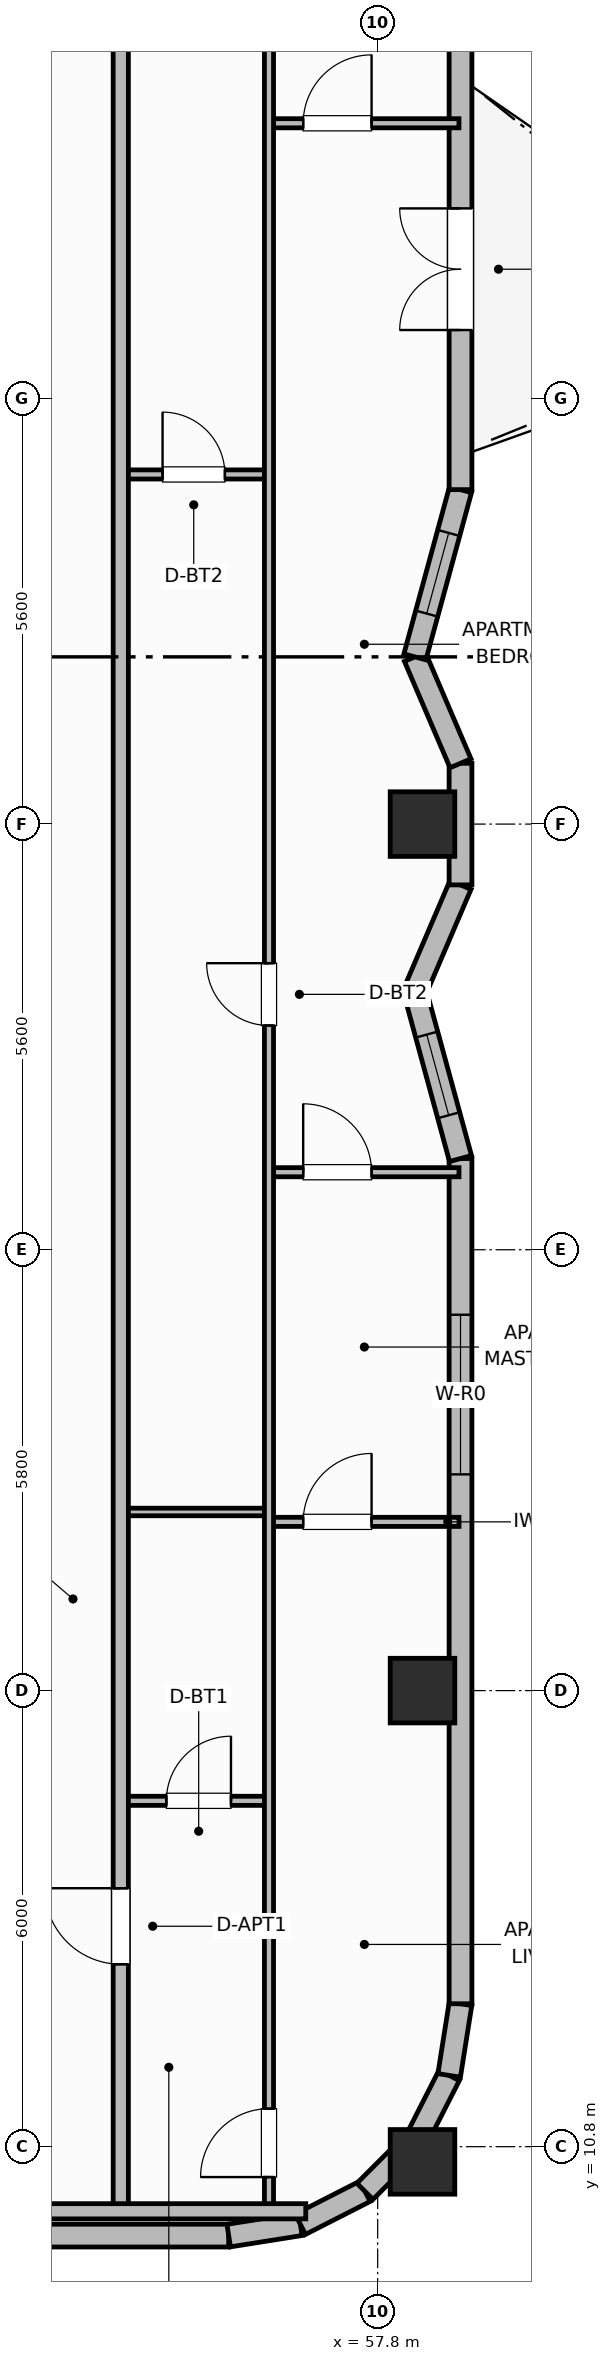
"""IFC4 building model, lengths in metres.
Left out: names, types, materials, properties, quantities, classifications, styles, units other than length and angle.
Written with IfcOpenShell. Run it as: python <this file> out.ifc"""

import sys

from ifc_helpers import new_model, si_unit, direction, frame, frame_2d, origin, origin_2d, place, context, subcontext, project, spatial, rectangle, extrude, element, fill, save


model = new_model("IFC4")
c1 = context("Model", 3, precision=1e-05, world=origin(), true_north=direction((0.0, 1.0)))
c2 = subcontext(c1, "Body", "Model", "MODEL_VIEW")
j1 = project(units=[si_unit("LENGTHUNIT", "METRE"), si_unit("PLANEANGLEUNIT", "RADIAN")], contexts=[c1])
p1 = place(None, origin())
s1 = spatial("IfcSite", under=j1, at=p1, CompositionType="ELEMENT")
p2 = place(p1, origin())
s2 = spatial("IfcBuilding", under=s1, at=p2, CompositionType="ELEMENT")
p3 = place(p2, frame((0.0, 0.0, 251.7)))
s3 = spatial("IfcBuildingStorey", under=s2, at=p3, CompositionType="ELEMENT", Elevation=251.7)
for number, where, z_axis, x_axis in (
    (1, (58.39, 10.6, 0.0), (0.0, 0.0, 1.0), (1.0, 0.0, 0.0)),
    (2, (58.39, 16.8, 0.0), (0.0, 0.0, 1.0), (1.0, 0.0, 0.0)),
    (3, (58.39, 28.2, 0.0), (0.0, 0.0, 1.0), (1.0, 0.0, 0.0)),
):
    element("IfcColumn", number, at=place(p3, frame(where, z_axis=z_axis, x_axis=x_axis)), inside=s3, PredefinedType="COLUMN", context=c2, shape_type="SweptSolid", body=[
        extrude(rectangle(XDim=0.85, YDim=0.85, at=origin_2d()), origin(), (0.0, 0.0, 1.0), 3.7),
    ])
p4 = place(p3, frame((22.56, 9.63, 0.0), z_axis=(0.0, 0.0, 1.0), x_axis=(1.0, 0.0, 0.0)))
e4 = element("IfcWall", 4, at=p4, inside=s3, PredefinedType="SOLIDWALL", context=c2, shape_type="SweptSolid", body=[
    extrude(rectangle(XDim=33.28, YDim=0.3, at=frame_2d((16.64, 0.0))), origin(), (0.0, 0.0, 1.0), 2.73),
])
p5 = place(p4, frame((4.461, 0.0, 0.95)))
e5 = element("IfcOpeningElement", 5, at=p5, cuts=e4, PredefinedType="OPENING", context=c2, shape_type="SweptSolid", body=[
    extrude(rectangle(XDim=1.1, YDim=1.65, at=frame_2d((0.55, 0.825))), frame((0.0, 0.16, 0.0), z_axis=(0.0, -1.0, 0.0), x_axis=(1.0, 0.0, 0.0)), (0.0, 0.0, 1.0), 0.32),
])
p6 = place(p4, frame((7.368, 0.0, 0.95)))
e6 = element("IfcOpeningElement", 6, at=p6, cuts=e4, PredefinedType="OPENING", context=c2, shape_type="SweptSolid", body=[
    extrude(rectangle(XDim=1.1, YDim=1.65, at=frame_2d((0.55, 0.825))), frame((0.0, 0.16, 0.0), z_axis=(0.0, -1.0, 0.0), x_axis=(1.0, 0.0, 0.0)), (0.0, 0.0, 1.0), 0.32),
])
p7 = place(p4, frame((10.275, 0.0, 0.95)))
e7 = element("IfcOpeningElement", 7, at=p7, cuts=e4, PredefinedType="OPENING", context=c2, shape_type="SweptSolid", body=[
    extrude(rectangle(XDim=1.1, YDim=1.65, at=frame_2d((0.55, 0.825))), frame((0.0, 0.16, 0.0), z_axis=(0.0, -1.0, 0.0), x_axis=(1.0, 0.0, 0.0)), (0.0, 0.0, 1.0), 0.32),
])
p8 = place(p4, frame((13.883, 0.0, 0.95)))
e8 = element("IfcOpeningElement", 8, at=p8, cuts=e4, PredefinedType="OPENING", context=c2, shape_type="SweptSolid", body=[
    extrude(rectangle(XDim=1.1, YDim=1.65, at=frame_2d((0.55, 0.825))), frame((0.0, 0.16, 0.0), z_axis=(0.0, -1.0, 0.0), x_axis=(1.0, 0.0, 0.0)), (0.0, 0.0, 1.0), 0.32),
])
p9 = place(p4, frame((16.09, 0.0, 0.95)))
e9 = element("IfcOpeningElement", 9, at=p9, cuts=e4, PredefinedType="OPENING", context=c2, shape_type="SweptSolid", body=[
    extrude(rectangle(XDim=1.1, YDim=1.65, at=frame_2d((0.55, 0.825))), frame((0.0, 0.16, 0.0), z_axis=(0.0, -1.0, 0.0), x_axis=(1.0, 0.0, 0.0)), (0.0, 0.0, 1.0), 0.32),
])
p10 = place(p4, frame((18.297, 0.0, 0.95)))
e10 = element("IfcOpeningElement", 10, at=p10, cuts=e4, PredefinedType="OPENING", context=c2, shape_type="SweptSolid", body=[
    extrude(rectangle(XDim=1.1, YDim=1.65, at=frame_2d((0.55, 0.825))), frame((0.0, 0.16, 0.0), z_axis=(0.0, -1.0, 0.0), x_axis=(1.0, 0.0, 0.0)), (0.0, 0.0, 1.0), 0.32),
])
p11 = place(p4, frame((21.905, 0.0, 0.95)))
e11 = element("IfcOpeningElement", 11, at=p11, cuts=e4, PredefinedType="OPENING", context=c2, shape_type="SweptSolid", body=[
    extrude(rectangle(XDim=1.1, YDim=1.65, at=frame_2d((0.55, 0.825))), frame((0.0, 0.16, 0.0), z_axis=(0.0, -1.0, 0.0), x_axis=(1.0, 0.0, 0.0)), (0.0, 0.0, 1.0), 0.32),
])
p12 = place(p4, frame((24.812, 0.0, 0.95)))
e12 = element("IfcOpeningElement", 12, at=p12, cuts=e4, PredefinedType="OPENING", context=c2, shape_type="SweptSolid", body=[
    extrude(rectangle(XDim=1.1, YDim=1.65, at=frame_2d((0.55, 0.825))), frame((0.0, 0.16, 0.0), z_axis=(0.0, -1.0, 0.0), x_axis=(1.0, 0.0, 0.0)), (0.0, 0.0, 1.0), 0.32),
])
p13 = place(p4, frame((27.719, 0.0, 0.95)))
e13 = element("IfcOpeningElement", 13, at=p13, cuts=e4, PredefinedType="OPENING", context=c2, shape_type="SweptSolid", body=[
    extrude(rectangle(XDim=1.1, YDim=1.65, at=frame_2d((0.55, 0.825))), frame((0.0, 0.16, 0.0), z_axis=(0.0, -1.0, 0.0), x_axis=(1.0, 0.0, 0.0)), (0.0, 0.0, 1.0), 0.32),
])
p14 = place(p3, frame((55.84, 9.63, 0.0), z_axis=(0.0, 0.0, 1.0), x_axis=(0.987663181641, 0.156593229835, 0.0)))
e14 = element("IfcWall", 14, at=p14, inside=s3, PredefinedType="SOLIDWALL", context=c2, shape_type="SweptSolid", body=[
    extrude(rectangle(XDim=0.954, YDim=0.3, at=frame_2d((0.477, 0.0))), origin(), (0.0, 0.0, 1.0), 2.73),
])
for number, where, z_axis, x_axis in (
    (15, (56.782, 9.779, 0.0), (0.0, 0.0, 1.0), (0.891, 0.454, 0.0)),
    (16, (57.633, 10.212, 0.0), (0.0, 0.0, 1.0), (0.707, 0.707, 0.0)),
    (17, (58.308, 10.887, 0.0), (0.0, 0.0, 1.0), (0.454, 0.891, 0.0)),
):
    element("IfcWall", number, at=place(p3, frame(where, z_axis=z_axis, x_axis=x_axis)), inside=s3, PredefinedType="SOLIDWALL", context=c2, shape_type="SweptSolid", body=[
        extrude(rectangle(XDim=0.954, YDim=0.3, at=frame_2d((0.477, 0.0))), origin(), (0.0, 0.0, 1.0), 2.73),
    ])
p15 = place(p3, frame((58.741, 11.738, 0.0), z_axis=(0.0, 0.0, 1.0), x_axis=(0.156343617883, 0.987702725088, 0.0)))
e18 = element("IfcWall", 18, at=p15, inside=s3, PredefinedType="SOLIDWALL", context=c2, shape_type="SweptSolid", body=[
    extrude(rectangle(XDim=0.954, YDim=0.3, at=frame_2d((0.477, 0.0))), origin(), (0.0, 0.0, 1.0), 2.73),
])
p16 = place(p3, frame((58.89, 12.68, 0.0), z_axis=(0.0, 0.0, 1.0), x_axis=(0.0, 1.0, 0.0)))
e19 = element("IfcWall", 19, at=p16, inside=s3, PredefinedType="SOLIDWALL", context=c2, shape_type="SweptSolid", body=[
    extrude(rectangle(XDim=11.12, YDim=0.3, at=frame_2d((5.56, 0.0))), origin(), (0.0, 0.0, 1.0), 2.73),
])
p17 = place(p16, frame((6.965, 0.0, 0.71)))
e20 = element("IfcOpeningElement", 20, at=p17, cuts=e19, PredefinedType="OPENING", context=c2, shape_type="SweptSolid", body=[
    extrude(rectangle(XDim=2.1, YDim=1.9, at=frame_2d((1.05, 0.95))), frame((0.0, 0.16, 0.0), z_axis=(0.0, -1.0, 0.0), x_axis=(1.0, 0.0, 0.0)), (0.0, 0.0, 1.0), 0.32),
])
p18 = place(p3, frame((58.89, 23.8, 0.0), z_axis=(0.0, 0.0, 1.0), x_axis=(-0.2630630484, 0.964778644336, 0.0)))
e21 = element("IfcWall", 21, at=p18, inside=s3, PredefinedType="SOLIDWALL", context=c2, shape_type="SweptSolid", body=[
    extrude(rectangle(XDim=2.28, YDim=0.3, at=frame_2d((1.14, 0.0))), origin(), (0.0, 0.0, 1.0), 2.73),
])
p19 = place(p18, frame((0.59, 0.0, 0.92)))
e22 = element("IfcOpeningElement", 22, at=p19, cuts=e21, PredefinedType="OPENING", context=c2, shape_type="SweptSolid", body=[
    extrude(rectangle(XDim=1.1, YDim=1.65, at=frame_2d((0.55, 0.825))), frame((0.0, 0.16, 0.0), z_axis=(0.0, -1.0, 0.0), x_axis=(1.0, 0.0, 0.0)), (0.0, 0.0, 1.0), 0.32),
])
p20 = place(p3, frame((58.29, 26.0, 0.0), z_axis=(0.0, 0.0, 1.0), x_axis=(0.393861257526, 0.919169902586, 0.0)))
e23 = element("IfcWall", 23, at=p20, inside=s3, PredefinedType="SOLIDWALL", context=c2, shape_type="SweptSolid", body=[
    extrude(rectangle(XDim=1.523, YDim=0.3, at=frame_2d((0.761, 0.0))), origin(), (0.0, 0.0, 1.0), 2.73),
])
p21 = place(p3, frame((58.89, 27.4, 0.0), z_axis=(0.0, 0.0, 1.0), x_axis=(0.0, 1.0, 0.0)))
e24 = element("IfcWall", 24, at=p21, inside=s3, PredefinedType="SOLIDWALL", context=c2, shape_type="SweptSolid", body=[
    extrude(rectangle(XDim=1.6, YDim=0.3, at=frame_2d((0.8, 0.0))), origin(), (0.0, 0.0, 1.0), 2.73),
])
p22 = place(p3, frame((58.89, 29.0, 0.0), z_axis=(0.0, 0.0, 1.0), x_axis=(-0.393861257526, 0.919169902586, 0.0)))
e25 = element("IfcWall", 25, at=p22, inside=s3, PredefinedType="SOLIDWALL", context=c2, shape_type="SweptSolid", body=[
    extrude(rectangle(XDim=1.523, YDim=0.3, at=frame_2d((0.761, 0.0))), origin(), (0.0, 0.0, 1.0), 2.73),
])
p23 = place(p3, frame((58.29, 30.4, 0.0), z_axis=(0.0, 0.0, 1.0), x_axis=(0.263035877812, 0.96478605244, 0.0)))
e26 = element("IfcWall", 26, at=p23, inside=s3, PredefinedType="SOLIDWALL", context=c2, shape_type="SweptSolid", body=[
    extrude(rectangle(XDim=2.281, YDim=0.3, at=frame_2d((1.14, 0.0))), origin(), (0.0, 0.0, 1.0), 2.73),
])
p24 = place(p23, frame((0.59, 0.0, 0.92)))
e27 = element("IfcOpeningElement", 27, at=p24, cuts=e26, PredefinedType="OPENING", context=c2, shape_type="SweptSolid", body=[
    extrude(rectangle(XDim=1.1, YDim=1.65, at=frame_2d((0.55, 0.825))), frame((0.0, 0.16, 0.0), z_axis=(0.0, -1.0, 0.0), x_axis=(1.0, 0.0, 0.0)), (0.0, 0.0, 1.0), 0.32),
])
p25 = place(p3, frame((58.89, 32.6, 0.0), z_axis=(0.0, 0.0, 1.0), x_axis=(0.0, 1.0, 0.0)))
e28 = element("IfcWall", 28, at=p25, inside=s3, PredefinedType="SOLIDWALL", context=c2, shape_type="SweptSolid", body=[
    extrude(rectangle(XDim=11.12, YDim=0.3, at=frame_2d((5.56, 0.0))), origin(), (0.0, 0.0, 1.0), 2.73),
])
p26 = place(p25, frame((2.1, 0.0, 0.0)))
e29 = element("IfcOpeningElement", 29, at=p26, cuts=e28, PredefinedType="OPENING", context=c2, shape_type="SweptSolid", body=[
    extrude(rectangle(XDim=1.6, YDim=2.1, at=frame_2d((0.8, 1.05))), frame((0.0, 0.16, 0.0), z_axis=(0.0, -1.0, 0.0), x_axis=(1.0, 0.0, 0.0)), (0.0, 0.0, 1.0), 0.32),
])
p27 = place(p25, frame((8.64, 0.0, 0.72)))
e30 = element("IfcOpeningElement", 30, at=p27, cuts=e28, PredefinedType="OPENING", context=c2, shape_type="SweptSolid", body=[
    extrude(rectangle(XDim=1.4, YDim=1.85, at=frame_2d((0.7, 0.925))), frame((0.0, 0.16, 0.0), z_axis=(0.0, -1.0, 0.0), x_axis=(1.0, 0.0, 0.0)), (0.0, 0.0, 1.0), 0.32),
])
p28 = place(p3, frame((54.42, 15.35, 0.0), z_axis=(0.0, 0.0, 1.0), x_axis=(1.0, 0.0, 0.0)))
e31 = element("IfcWall", 31, at=p28, inside=s3, PredefinedType="PARTITIONING", context=c2, shape_type="SweptSolid", body=[
    extrude(rectangle(XDim=1.95, YDim=0.12, at=frame_2d((0.975, 0.0))), origin(), (0.0, 0.0, 1.0), 2.56),
])
p29 = place(p28, frame((0.6, 0.0, 0.0)))
e32 = element("IfcOpeningElement", 32, at=p29, cuts=e31, PredefinedType="OPENING", context=c2, shape_type="SweptSolid", body=[
    extrude(rectangle(XDim=0.85, YDim=2.1, at=frame_2d((0.425, 1.05))), frame((0.0, 0.07, 0.0), z_axis=(0.0, -1.0, 0.0), x_axis=(1.0, 0.0, 0.0)), (0.0, 0.0, 1.0), 0.14),
])
p30 = place(p3, frame((54.42, 19.15, 0.0), z_axis=(0.0, 0.0, 1.0), x_axis=(1.0, 0.0, 0.0)))
e33 = element("IfcWall", 33, at=p30, inside=s3, PredefinedType="PARTITIONING", context=c2, shape_type="SweptSolid", body=[
    extrude(rectangle(XDim=1.95, YDim=0.1, at=frame_2d((0.975, 0.0))), origin(), (0.0, 0.0, 1.0), 2.56),
])
p31 = place(p3, frame((54.42, 32.8, 0.0), z_axis=(0.0, 0.0, 1.0), x_axis=(1.0, 0.0, 0.0)))
e34 = element("IfcWall", 34, at=p31, inside=s3, PredefinedType="PARTITIONING", context=c2, shape_type="SweptSolid", body=[
    extrude(rectangle(XDim=1.95, YDim=0.12, at=frame_2d((0.975, 0.0))), origin(), (0.0, 0.0, 1.0), 2.56),
])
p32 = place(p31, frame((0.55, 0.0, 0.0)))
e35 = element("IfcOpeningElement", 35, at=p32, cuts=e34, PredefinedType="OPENING", context=c2, shape_type="SweptSolid", body=[
    extrude(rectangle(XDim=0.82, YDim=2.08, at=frame_2d((0.41, 1.04))), frame((0.0, 0.07, 0.0), z_axis=(0.0, -1.0, 0.0), x_axis=(1.0, 0.0, 0.0)), (0.0, 0.0, 1.0), 0.14),
])
p33 = place(p3, frame((56.37, 19.02, 0.0), z_axis=(0.0, 0.0, 1.0), x_axis=(1.0, 0.0, 0.0)))
e36 = element("IfcWall", 36, at=p33, inside=s3, PredefinedType="PARTITIONING", context=c2, shape_type="SweptSolid", body=[
    extrude(rectangle(XDim=2.5, YDim=0.12, at=frame_2d((1.25, 0.0))), origin(), (0.0, 0.0, 1.0), 2.56),
])
p34 = place(p33, frame((0.45, 0.0, 0.0)))
e37 = element("IfcOpeningElement", 37, at=p34, cuts=e36, PredefinedType="OPENING", context=c2, shape_type="SweptSolid", body=[
    extrude(rectangle(XDim=0.9, YDim=2.1, at=frame_2d((0.45, 1.05))), frame((0.0, 0.07, 0.0), z_axis=(0.0, -1.0, 0.0), x_axis=(1.0, 0.0, 0.0)), (0.0, 0.0, 1.0), 0.14),
])
p35 = place(p3, frame((56.37, 23.62, 0.0), z_axis=(0.0, 0.0, 1.0), x_axis=(1.0, 0.0, 0.0)))
e38 = element("IfcWall", 38, at=p35, inside=s3, PredefinedType="PARTITIONING", context=c2, shape_type="SweptSolid", body=[
    extrude(rectangle(XDim=2.5, YDim=0.12, at=frame_2d((1.25, 0.0))), origin(), (0.0, 0.0, 1.0), 2.56),
])
p36 = place(p35, frame((0.45, 0.0, 0.0)))
e39 = element("IfcOpeningElement", 39, at=p36, cuts=e38, PredefinedType="OPENING", context=c2, shape_type="SweptSolid", body=[
    extrude(rectangle(XDim=0.9, YDim=2.1, at=frame_2d((0.45, 1.05))), frame((0.0, 0.07, 0.0), z_axis=(0.0, -1.0, 0.0), x_axis=(1.0, 0.0, 0.0)), (0.0, 0.0, 1.0), 0.14),
])
p37 = place(p3, frame((56.37, 37.42, 0.0), z_axis=(0.0, 0.0, 1.0), x_axis=(1.0, 0.0, 0.0)))
e40 = element("IfcWall", 40, at=p37, inside=s3, PredefinedType="PARTITIONING", context=c2, shape_type="SweptSolid", body=[
    extrude(rectangle(XDim=2.5, YDim=0.12, at=frame_2d((1.25, 0.0))), origin(), (0.0, 0.0, 1.0), 2.56),
])
p38 = place(p37, frame((0.45, 0.0, 0.0)))
e41 = element("IfcOpeningElement", 41, at=p38, cuts=e40, PredefinedType="OPENING", context=c2, shape_type="SweptSolid", body=[
    extrude(rectangle(XDim=0.9, YDim=2.1, at=frame_2d((0.45, 1.05))), frame((0.0, 0.07, 0.0), z_axis=(0.0, -1.0, 0.0), x_axis=(1.0, 0.0, 0.0)), (0.0, 0.0, 1.0), 0.14),
])
p39 = place(p3, frame((56.37, 9.99, 0.0), z_axis=(0.0, 0.0, 1.0), x_axis=(0.0, 1.0, 0.0)))
e42 = element("IfcWall", 42, at=p39, inside=s3, PredefinedType="PARTITIONING", context=c2, shape_type="SweptSolid", body=[
    extrude(rectangle(XDim=36.42, YDim=0.12, at=frame_2d((18.21, 0.0))), origin(), (0.0, 0.0, 1.0), 2.56),
])
p40 = place(p39, frame((0.41, 0.0, 0.0)))
e43 = element("IfcOpeningElement", 43, at=p40, cuts=e42, PredefinedType="OPENING", context=c2, shape_type="SweptSolid", body=[
    extrude(rectangle(XDim=0.9, YDim=2.1, at=frame_2d((0.45, 1.05))), frame((0.0, 0.07, 0.0), z_axis=(0.0, -1.0, 0.0), x_axis=(1.0, 0.0, 0.0)), (0.0, 0.0, 1.0), 0.14),
])
p41 = place(p39, frame((15.56, 0.0, 0.0)))
e44 = element("IfcOpeningElement", 44, at=p41, cuts=e42, PredefinedType="OPENING", context=c2, shape_type="SweptSolid", body=[
    extrude(rectangle(XDim=0.82, YDim=2.08, at=frame_2d((0.41, 1.04))), frame((0.0, 0.07, 0.0), z_axis=(0.0, -1.0, 0.0), x_axis=(1.0, 0.0, 0.0)), (0.0, 0.0, 1.0), 0.14),
])
p42 = place(p3, frame((54.42, 9.95, 0.0), z_axis=(0.0, 0.0, 1.0), x_axis=(0.0, 1.0, 0.0)))
e45 = element("IfcWall", 45, at=p42, inside=s3, PredefinedType="PARTITIONING", context=c2, shape_type="SweptSolid", body=[
    extrude(rectangle(XDim=36.5, YDim=0.2, at=frame_2d((18.25, 0.0))), origin(), (0.0, 0.0, 1.0), 2.56),
])
p43 = place(p42, frame((3.25, 0.0, 0.0)))
e46 = element("IfcOpeningElement", 46, at=p43, cuts=e45, PredefinedType="OPENING", context=c2, shape_type="SweptSolid", body=[
    extrude(rectangle(XDim=1.0, YDim=2.15, at=frame_2d((0.5, 1.075))), frame((0.0, 0.11, 0.0), z_axis=(0.0, -1.0, 0.0), x_axis=(1.0, 0.0, 0.0)), (0.0, 0.0, 1.0), 0.22),
])
p44 = place(p3, frame((53.1, 9.95, 0.0), z_axis=(0.0, 0.0, 1.0), x_axis=(1.0, 0.0, 0.0)))
e47 = element("IfcWall", 47, at=p44, inside=s3, PredefinedType="PARTITIONING", context=c2, shape_type="SweptSolid", body=[
    extrude(rectangle(XDim=3.754, YDim=0.2, at=frame_2d((1.877, 0.0))), origin(), (0.0, 0.0, 1.0), 2.56),
])
p45 = place(p17, origin())
e48 = element("IfcWindow", 48, at=p45, inside=s3, PartitioningType="SINGLE_PANEL", PredefinedType="WINDOW", context=c2, shape_type="SweptSolid", body=[
    extrude(rectangle(XDim=2.1, YDim=1.9, at=frame_2d((1.05, 0.95))), frame((0.0, 0.03, 0.0), z_axis=(0.0, -1.0, 0.0), x_axis=(1.0, 0.0, 0.0)), (0.0, 0.0, 1.0), 0.06),
])
fill(e20, e48)
p46 = place(p19, origin())
e49 = element("IfcWindow", 49, at=p46, inside=s3, PartitioningType="SINGLE_PANEL", PredefinedType="WINDOW", context=c2, shape_type="SweptSolid", body=[
    extrude(rectangle(XDim=1.1, YDim=1.65, at=frame_2d((0.55, 0.825))), frame((0.0, 0.03, 0.0), z_axis=(0.0, -1.0, 0.0), x_axis=(1.0, 0.0, 0.0)), (0.0, 0.0, 1.0), 0.06),
])
fill(e22, e49)
p47 = place(p24, origin())
e50 = element("IfcWindow", 50, at=p47, inside=s3, PartitioningType="SINGLE_PANEL", PredefinedType="WINDOW", context=c2, shape_type="SweptSolid", body=[
    extrude(rectangle(XDim=1.1, YDim=1.65, at=frame_2d((0.55, 0.825))), frame((0.0, 0.03, 0.0), z_axis=(0.0, -1.0, 0.0), x_axis=(1.0, 0.0, 0.0)), (0.0, 0.0, 1.0), 0.06),
])
fill(e27, e50)
p48 = place(p26, origin())
e51 = element("IfcDoor", 51, at=p48, inside=s3, OperationType="DOUBLE_DOOR_SINGLE_SWING", PredefinedType="DOOR", context=c2, shape_type="SweptSolid", body=[
    extrude(rectangle(XDim=1.6, YDim=2.1, at=frame_2d((0.8, 1.05))), frame((0.0, 0.025, 0.0), z_axis=(0.0, -1.0, 0.0), x_axis=(1.0, 0.0, 0.0)), (0.0, 0.0, 1.0), 0.05),
])
fill(e29, e51)
p49 = place(p29, origin())
e52 = element("IfcDoor", 52, at=p49, inside=s3, OperationType="SINGLE_SWING_RIGHT", PredefinedType="DOOR", context=c2, shape_type="SweptSolid", body=[
    extrude(rectangle(XDim=0.85, YDim=2.1, at=frame_2d((0.425, 1.05))), frame((0.0, 0.025, 0.0), z_axis=(0.0, -1.0, 0.0), x_axis=(1.0, 0.0, 0.0)), (0.0, 0.0, 1.0), 0.05),
])
fill(e32, e52)
p50 = place(p32, origin())
e53 = element("IfcDoor", 53, at=p50, inside=s3, OperationType="SINGLE_SWING_LEFT", PredefinedType="DOOR", context=c2, shape_type="SweptSolid", body=[
    extrude(rectangle(XDim=0.82, YDim=2.08, at=frame_2d((0.41, 1.04))), frame((0.0, 0.025, 0.0), z_axis=(0.0, -1.0, 0.0), x_axis=(1.0, 0.0, 0.0)), (0.0, 0.0, 1.0), 0.05),
])
fill(e35, e53)
p51 = place(p34, origin())
e54 = element("IfcDoor", 54, at=p51, inside=s3, OperationType="SINGLE_SWING_RIGHT", PredefinedType="DOOR", context=c2, shape_type="SweptSolid", body=[
    extrude(rectangle(XDim=0.9, YDim=2.1, at=frame_2d((0.45, 1.05))), frame((0.0, 0.025, 0.0), z_axis=(0.0, -1.0, 0.0), x_axis=(1.0, 0.0, 0.0)), (0.0, 0.0, 1.0), 0.05),
])
fill(e37, e54)
p52 = place(p36, origin())
e55 = element("IfcDoor", 55, at=p52, inside=s3, OperationType="SINGLE_SWING_LEFT", PredefinedType="DOOR", context=c2, shape_type="SweptSolid", body=[
    extrude(rectangle(XDim=0.9, YDim=2.1, at=frame_2d((0.45, 1.05))), frame((0.0, 0.025, 0.0), z_axis=(0.0, -1.0, 0.0), x_axis=(1.0, 0.0, 0.0)), (0.0, 0.0, 1.0), 0.05),
])
fill(e39, e55)
p53 = place(p38, origin())
e56 = element("IfcDoor", 56, at=p53, inside=s3, OperationType="SINGLE_SWING_RIGHT", PredefinedType="DOOR", context=c2, shape_type="SweptSolid", body=[
    extrude(rectangle(XDim=0.9, YDim=2.1, at=frame_2d((0.45, 1.05))), frame((0.0, 0.025, 0.0), z_axis=(0.0, -1.0, 0.0), x_axis=(1.0, 0.0, 0.0)), (0.0, 0.0, 1.0), 0.05),
])
fill(e41, e56)
p54 = place(p40, origin())
e57 = element("IfcDoor", 57, at=p54, inside=s3, OperationType="SINGLE_SWING_LEFT", PredefinedType="DOOR", context=c2, shape_type="SweptSolid", body=[
    extrude(rectangle(XDim=0.9, YDim=2.1, at=frame_2d((0.45, 1.05))), frame((0.0, 0.025, 0.0), z_axis=(0.0, -1.0, 0.0), x_axis=(1.0, 0.0, 0.0)), (0.0, 0.0, 1.0), 0.05),
])
fill(e43, e57)
p55 = place(p41, origin())
e58 = element("IfcDoor", 58, at=p55, inside=s3, OperationType="SINGLE_SWING_RIGHT", PredefinedType="DOOR", context=c2, shape_type="SweptSolid", body=[
    extrude(rectangle(XDim=0.82, YDim=2.08, at=frame_2d((0.41, 1.04))), frame((0.0, 0.025, 0.0), z_axis=(0.0, -1.0, 0.0), x_axis=(1.0, 0.0, 0.0)), (0.0, 0.0, 1.0), 0.05),
])
fill(e44, e58)
p56 = place(p43, origin())
e59 = element("IfcDoor", 59, at=p56, inside=s3, OperationType="SINGLE_SWING_RIGHT", PredefinedType="DOOR", context=c2, shape_type="SweptSolid", body=[
    extrude(rectangle(XDim=1.0, YDim=2.15, at=frame_2d((0.5, 1.075))), frame((0.0, 0.025, 0.0), z_axis=(0.0, -1.0, 0.0), x_axis=(1.0, 0.0, 0.0)), (0.0, 0.0, 1.0), 0.05),
])
fill(e46, e59)
save(model, sys.argv[1])
